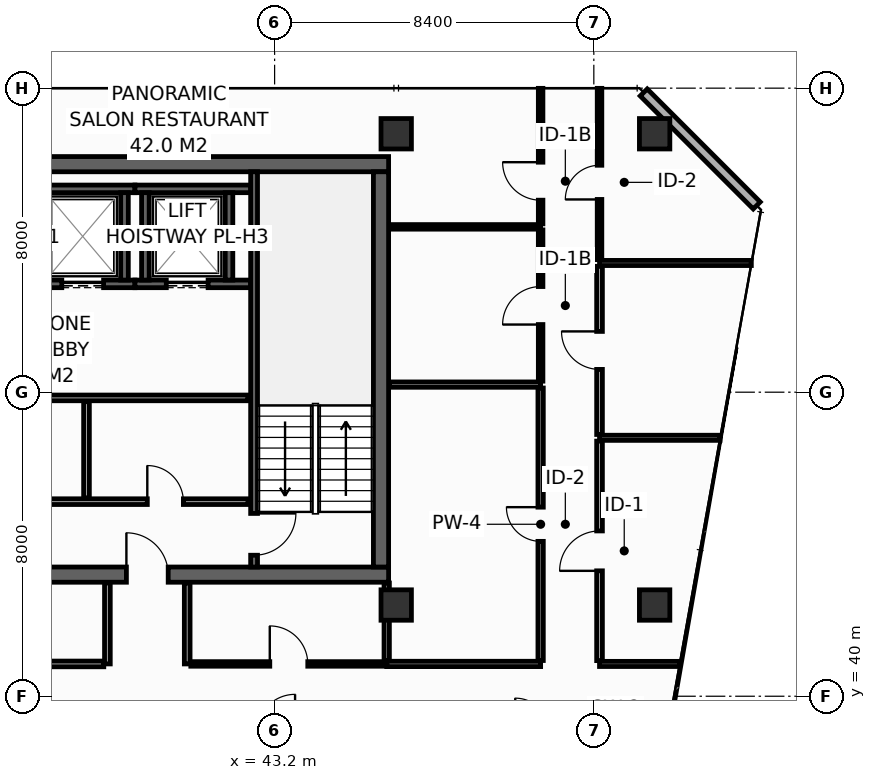
"""IFC4 building model, lengths in metres.
Left out: names, types, materials, properties, quantities, classifications, styles, units other than length and angle.
Written with IfcOpenShell. Run it as: python <this file> out.ifc"""

import sys

from ifc_helpers import new_model, si_unit, direction, frame, frame_2d, origin, origin_2d, place, context, subcontext, project, spatial, rectangle, hollow_rectangle, extrude, element, fill, save


model = new_model("IFC4")
c1 = context("Model", 3, precision=1e-05, world=origin(), true_north=direction((0.0, 1.0)))
c2 = subcontext(c1, "Body", "Model", "MODEL_VIEW")
j1 = project(units=[si_unit("LENGTHUNIT", "METRE"), si_unit("PLANEANGLEUNIT", "RADIAN")], contexts=[c1])
p1 = place(None, origin())
s1 = spatial("IfcSite", under=j1, at=p1, CompositionType="ELEMENT")
p2 = place(p1, origin())
s2 = spatial("IfcBuilding", under=s1, at=p2, CompositionType="ELEMENT")
p3 = place(p2, frame((0.0, 0.0, 253.4)))
s3 = spatial("IfcBuildingStorey", under=s2, at=p3, CompositionType="ELEMENT", Elevation=253.4)
p4 = place(p3, frame((13.7, 43.2, 0.0), z_axis=(0.0, 0.0, 1.0), x_axis=(1.0, 0.0, 0.0)))
e1 = element("IfcWall", 1, at=p4, inside=s3, PredefinedType="SHEAR", context=c2, shape_type="SweptSolid", body=[
    extrude(rectangle(XDim=32.5, YDim=0.4, at=frame_2d((16.25, 0.0))), origin(), (0.0, 0.0, 1.0), 3.55),
])
p5 = place(p4, frame((5.4, 0.0, 0.0)))
e2 = element("IfcOpeningElement", 2, at=p5, cuts=e1, PredefinedType="OPENING", context=c2, shape_type="SweptSolid", body=[
    extrude(rectangle(XDim=1.1, YDim=2.15, at=frame_2d((0.55, 1.075))), frame((0.0, 0.21, 0.0), z_axis=(0.0, -1.0, 0.0), x_axis=(1.0, 0.0, 0.0)), (0.0, 0.0, 1.0), 0.42),
])
p6 = place(p4, frame((25.6, 0.0, 0.0)))
e3 = element("IfcOpeningElement", 3, at=p6, cuts=e1, PredefinedType="OPENING", context=c2, shape_type="SweptSolid", body=[
    extrude(rectangle(XDim=1.1, YDim=2.15, at=frame_2d((0.55, 1.075))), frame((0.0, 0.21, 0.0), z_axis=(0.0, -1.0, 0.0), x_axis=(1.0, 0.0, 0.0)), (0.0, 0.0, 1.0), 0.42),
])
p7 = place(p3, frame((13.7, 54.0, 0.0), z_axis=(0.0, 0.0, 1.0), x_axis=(1.0, 0.0, 0.0)))
e4 = element("IfcWall", 4, at=p7, inside=s3, PredefinedType="SHEAR", context=c2, shape_type="SweptSolid", body=[
    extrude(rectangle(XDim=32.5, YDim=0.4, at=frame_2d((16.25, 0.0))), origin(), (0.0, 0.0, 1.0), 3.55),
])
p8 = place(p3, frame((46.0, 43.4, 0.0), z_axis=(0.0, 0.0, 1.0), x_axis=(0.0, 1.0, 0.0)))
e5 = element("IfcWall", 5, at=p8, inside=s3, PredefinedType="SHEAR", context=c2, shape_type="SweptSolid", body=[
    extrude(rectangle(XDim=10.4, YDim=0.4, at=frame_2d((5.2, 0.0))), origin(), (0.0, 0.0, 1.0), 3.55),
])
for number, where, z_axis, x_axis in (
    (6, (46.4, 54.8, 0.0), (0.0, 0.0, 1.0), (1.0, 0.0, 0.0)),
    (7, (53.2, 54.8, 0.0), (0.0, 0.0, 1.0), (1.0, 0.0, 0.0)),
    (8, (46.4, 42.4, 0.0), (0.0, 0.0, 1.0), (1.0, 0.0, 0.0)),
    (9, (53.2, 42.4, 0.0), (0.0, 0.0, 1.0), (1.0, 0.0, 0.0)),
):
    element("IfcColumn", number, at=place(p3, frame(where, z_axis=z_axis, x_axis=x_axis)), inside=s3, PredefinedType="COLUMN", context=c2, shape_type="SweptSolid", body=[
        extrude(hollow_rectangle(XDim=0.8, YDim=0.8, WallThickness=0.036, at=origin_2d()), origin(), (0.0, 0.0, 1.0), 3.8),
    ])
p9 = place(p3, frame((36.775, 50.85, 0.0), z_axis=(0.0, 0.0, 1.0), x_axis=(1.0, 0.0, 0.0)))
e10 = element("IfcWall", 10, at=p9, inside=s3, PredefinedType="SHEAR", context=c2, shape_type="SweptSolid", body=[
    extrude(rectangle(XDim=2.75, YDim=0.2, at=frame_2d((1.375, 0.0))), origin(), (0.0, 0.0, 1.0), 3.55),
])
p10 = place(p9, frame((0.825, 0.0, 0.0)))
e11 = element("IfcOpeningElement", 11, at=p10, cuts=e10, PredefinedType="OPENING", context=c2, shape_type="SweptSolid", body=[
    extrude(rectangle(XDim=1.1, YDim=2.2, at=frame_2d((0.55, 1.1))), frame((0.0, 0.11, 0.0), z_axis=(0.0, -1.0, 0.0), x_axis=(1.0, 0.0, 0.0)), (0.0, 0.0, 1.0), 0.22),
])
p11 = place(p3, frame((36.775, 53.35, 0.0), z_axis=(0.0, 0.0, 1.0), x_axis=(1.0, 0.0, 0.0)))
e12 = element("IfcWall", 12, at=p11, inside=s3, PredefinedType="SHEAR", context=c2, shape_type="SweptSolid", body=[
    extrude(rectangle(XDim=2.75, YDim=0.2, at=frame_2d((1.375, 0.0))), origin(), (0.0, 0.0, 1.0), 3.55),
])
p12 = place(p3, frame((39.25, 50.95, 0.0), z_axis=(0.0, 0.0, 1.0), x_axis=(0.0, 1.0, 0.0)))
e13 = element("IfcWall", 13, at=p12, inside=s3, PredefinedType="SHEAR", context=c2, shape_type="SweptSolid", body=[
    extrude(rectangle(XDim=2.3, YDim=0.2, at=frame_2d((1.15, 0.0))), origin(), (0.0, 0.0, 1.0), 3.55),
])
p13 = place(p3, frame((39.525, 50.85, 0.0), z_axis=(0.0, 0.0, 1.0), x_axis=(1.0, 0.0, 0.0)))
e14 = element("IfcWall", 14, at=p13, inside=s3, PredefinedType="SHEAR", context=c2, shape_type="SweptSolid", body=[
    extrude(rectangle(XDim=3.045, YDim=0.2, at=frame_2d((1.522, 0.0))), origin(), (0.0, 0.0, 1.0), 3.55),
])
p14 = place(p13, frame((0.825, 0.0, 0.0)))
e15 = element("IfcOpeningElement", 15, at=p14, cuts=e14, PredefinedType="OPENING", context=c2, shape_type="SweptSolid", body=[
    extrude(rectangle(XDim=1.1, YDim=2.2, at=frame_2d((0.55, 1.1))), frame((0.0, 0.11, 0.0), z_axis=(0.0, -1.0, 0.0), x_axis=(1.0, 0.0, 0.0)), (0.0, 0.0, 1.0), 0.22),
])
p15 = place(p3, frame((39.525, 53.35, 0.0), z_axis=(0.0, 0.0, 1.0), x_axis=(1.0, 0.0, 0.0)))
e16 = element("IfcWall", 16, at=p15, inside=s3, PredefinedType="SHEAR", context=c2, shape_type="SweptSolid", body=[
    extrude(rectangle(XDim=3.045, YDim=0.2, at=frame_2d((1.522, 0.0))), origin(), (0.0, 0.0, 1.0), 3.55),
])
for number, where, z_axis, x_axis in (
    (17, (39.8, 50.95, 0.0), (0.0, 0.0, 1.0), (0.0, 1.0, 0.0)),
    (18, (42.0, 50.95, 0.0), (0.0, 0.0, 1.0), (0.0, 1.0, 0.0)),
):
    element("IfcWall", number, at=place(p3, frame(where, z_axis=z_axis, x_axis=x_axis)), inside=s3, PredefinedType="SHEAR", context=c2, shape_type="SweptSolid", body=[
        extrude(rectangle(XDim=2.3, YDim=0.2, at=frame_2d((1.15, 0.0))), origin(), (0.0, 0.0, 1.0), 3.55),
    ])
p16 = place(p3, frame((42.66, 53.8, 0.0), z_axis=(0.0, 0.0, 1.0), x_axis=(0.0, -1.0, 0.0)))
e19 = element("IfcWall", 19, at=p16, inside=s3, PredefinedType="SHEAR", context=c2, shape_type="SweptSolid", body=[
    extrude(rectangle(XDim=10.4, YDim=0.18, at=frame_2d((5.2, 0.0))), origin(), (0.0, 0.0, 1.0), 3.55),
])
p17 = place(p16, frame((8.99, 0.0, 0.0)))
e20 = element("IfcOpeningElement", 20, at=p17, cuts=e19, PredefinedType="OPENING", context=c2, shape_type="SweptSolid", body=[
    extrude(rectangle(XDim=1.1, YDim=2.15, at=frame_2d((0.55, 1.075))), frame((0.0, 0.1, 0.0), z_axis=(0.0, -1.0, 0.0), x_axis=(1.0, 0.0, 0.0)), (0.0, 0.0, 1.0), 0.2),
])
p18 = place(p3, frame((34.05, 45.12, 0.0), z_axis=(0.0, 0.0, 1.0), x_axis=(1.0, 0.0, 0.0)))
e21 = element("IfcWall", 21, at=p18, inside=s3, PredefinedType="PARTITIONING", context=c2, shape_type="SweptSolid", body=[
    extrude(rectangle(XDim=8.45, YDim=0.15, at=frame_2d((4.225, 0.0))), origin(), (0.0, 0.0, 1.0), 3.55),
])
p19 = place(p18, frame((1.5, 0.0, 0.0)))
e22 = element("IfcOpeningElement", 22, at=p19, cuts=e21, PredefinedType="OPENING", context=c2, shape_type="SweptSolid", body=[
    extrude(rectangle(XDim=0.95, YDim=2.15, at=frame_2d((0.475, 1.075))), frame((0.0, 0.085, 0.0), z_axis=(0.0, -1.0, 0.0), x_axis=(1.0, 0.0, 0.0)), (0.0, 0.0, 1.0), 0.17),
])
p20 = place(p18, frame((5.8, 0.0, 0.0)))
e23 = element("IfcOpeningElement", 23, at=p20, cuts=e21, PredefinedType="OPENING", context=c2, shape_type="SweptSolid", body=[
    extrude(rectangle(XDim=0.95, YDim=2.15, at=frame_2d((0.475, 1.075))), frame((0.0, 0.085, 0.0), z_axis=(0.0, -1.0, 0.0), x_axis=(1.0, 0.0, 0.0)), (0.0, 0.0, 1.0), 0.17),
])
p21 = place(p3, frame((34.05, 47.85, 0.0), z_axis=(0.0, 0.0, 1.0), x_axis=(1.0, 0.0, 0.0)))
e24 = element("IfcWall", 24, at=p21, inside=s3, PredefinedType="PARTITIONING", context=c2, shape_type="SweptSolid", body=[
    extrude(rectangle(XDim=8.45, YDim=0.15, at=frame_2d((4.225, 0.0))), origin(), (0.0, 0.0, 1.0), 3.55),
])
p22 = place(p3, frame((38.25, 45.22, 0.0), z_axis=(0.0, 0.0, 1.0), x_axis=(0.0, 1.0, 0.0)))
e25 = element("IfcWall", 25, at=p22, inside=s3, PredefinedType="PARTITIONING", context=c2, shape_type="SweptSolid", body=[
    extrude(rectangle(XDim=2.53, YDim=0.15, at=frame_2d((1.265, 0.0))), origin(), (0.0, 0.0, 1.0), 3.55),
])
p23 = place(p3, frame((55.887, 52.913, 0.0), z_axis=(0.0, 0.0, 1.0), x_axis=(-0.707106781187, 0.707106781187, 0.0)))
e26 = element("IfcWall", 26, at=p23, inside=s3, PredefinedType="STANDARD", context=c2, shape_type="SweptSolid", body=[
    extrude(rectangle(XDim=4.206, YDim=0.26, at=frame_2d((2.103, 0.0))), origin(), (0.0, 0.0, 1.0), 3.55),
])
p24 = place(p3, frame((46.15, 40.85, 0.0), z_axis=(0.0, 0.0, 1.0), x_axis=(1.0, 0.0, 0.0)))
e27 = element("IfcWall", 27, at=p24, inside=s3, PredefinedType="PARTITIONING", context=c2, shape_type="SweptSolid", body=[
    extrude(rectangle(XDim=4.05, YDim=0.14, at=frame_2d((2.025, 0.0))), origin(), (0.0, 0.0, 1.0), 3.55),
])
p25 = place(p3, frame((46.15, 40.94, 0.0), z_axis=(0.0, 0.0, 1.0), x_axis=(0.0, 1.0, 0.0)))
e28 = element("IfcWall", 28, at=p25, inside=s3, PredefinedType="PARTITIONING", context=c2, shape_type="SweptSolid", body=[
    extrude(rectangle(XDim=2.04, YDim=0.14, at=frame_2d((1.02, 0.0))), origin(), (0.0, 0.0, 1.0), 3.55),
])
p26 = place(p3, frame((46.22, 48.2, 0.0), z_axis=(0.0, 0.0, 1.0), x_axis=(1.0, 0.0, 0.0)))
e29 = element("IfcWall", 29, at=p26, inside=s3, PredefinedType="PARTITIONING", context=c2, shape_type="SweptSolid", body=[
    extrude(rectangle(XDim=3.98, YDim=0.14, at=frame_2d((1.99, 0.0))), origin(), (0.0, 0.0, 1.0), 3.55),
])
p27 = place(p3, frame((50.2, 40.94, 0.0), z_axis=(0.0, 0.0, 1.0), x_axis=(0.0, 1.0, 0.0)))
e30 = element("IfcWall", 30, at=p27, inside=s3, PredefinedType="PARTITIONING", context=c2, shape_type="SweptSolid", body=[
    extrude(rectangle(XDim=7.17, YDim=0.14, at=frame_2d((3.585, 0.0))), origin(), (0.0, 0.0, 1.0), 2.947),
])
p28 = place(p27, frame((3.135, 0.0, 0.0)))
e31 = element("IfcOpeningElement", 31, at=p28, cuts=e30, PredefinedType="OPENING", context=c2, shape_type="SweptSolid", body=[
    extrude(rectangle(XDim=0.9, YDim=2.1, at=frame_2d((0.45, 1.05))), frame((0.0, 0.08, 0.0), z_axis=(0.0, -1.0, 0.0), x_axis=(1.0, 0.0, 0.0)), (0.0, 0.0, 1.0), 0.16),
])
p29 = place(p3, frame((46.22, 52.35, 0.0), z_axis=(0.0, 0.0, 1.0), x_axis=(1.0, 0.0, 0.0)))
e32 = element("IfcWall", 32, at=p29, inside=s3, PredefinedType="PARTITIONING", context=c2, shape_type="SweptSolid", body=[
    extrude(rectangle(XDim=3.98, YDim=0.12, at=frame_2d((1.99, 0.0))), origin(), (0.0, 0.0, 1.0), 3.55),
])
p30 = place(p3, frame((50.2, 48.29, 0.0), z_axis=(0.0, 0.0, 1.0), x_axis=(0.0, 1.0, 0.0)))
e33 = element("IfcWall", 33, at=p30, inside=s3, PredefinedType="PARTITIONING", context=c2, shape_type="SweptSolid", body=[
    extrude(rectangle(XDim=3.98, YDim=0.12, at=frame_2d((1.99, 0.0))), origin(), (0.0, 0.0, 1.0), 3.55),
])
p31 = place(p30, frame((1.49, 0.0, 0.0)))
e34 = element("IfcOpeningElement", 34, at=p31, cuts=e33, PredefinedType="OPENING", context=c2, shape_type="SweptSolid", body=[
    extrude(rectangle(XDim=1.0, YDim=2.15, at=frame_2d((0.5, 1.075))), frame((0.0, 0.07, 0.0), z_axis=(0.0, -1.0, 0.0), x_axis=(1.0, 0.0, 0.0)), (0.0, 0.0, 1.0), 0.14),
])
p32 = place(p3, frame((50.2, 52.43, 0.0), z_axis=(0.0, 0.0, 1.0), x_axis=(0.0, 1.0, 0.0)))
e35 = element("IfcWall", 35, at=p32, inside=s3, PredefinedType="PARTITIONING", context=c2, shape_type="SweptSolid", body=[
    extrude(rectangle(XDim=3.565, YDim=0.12, at=frame_2d((1.783, 0.0))), origin(), (0.0, 0.0, 1.0), 2.935),
])
p33 = place(p32, frame((0.622, 0.0, 0.0)))
e36 = element("IfcOpeningElement", 36, at=p33, cuts=e35, PredefinedType="OPENING", context=c2, shape_type="SweptSolid", body=[
    extrude(rectangle(XDim=1.0, YDim=2.15, at=frame_2d((0.5, 1.075))), frame((0.0, 0.07, 0.0), z_axis=(0.0, -1.0, 0.0), x_axis=(1.0, 0.0, 0.0)), (0.0, 0.0, 1.0), 0.14),
])
p34 = place(p3, frame((51.75, 40.85, 0.0), z_axis=(0.0, 0.0, 1.0), x_axis=(1.0, 0.0, 0.0)))
e37 = element("IfcWall", 37, at=p34, inside=s3, PredefinedType="PARTITIONING", context=c2, shape_type="SweptSolid", body=[
    extrude(rectangle(XDim=2.107, YDim=0.135, at=frame_2d((1.053, 0.0))), origin(), (0.0, 0.0, 1.0), 3.085),
])
p35 = place(p3, frame((51.75, 46.8, 0.0), z_axis=(0.0, 0.0, 1.0), x_axis=(1.0, 0.0, 0.0)))
e38 = element("IfcWall", 38, at=p35, inside=s3, PredefinedType="PARTITIONING", context=c2, shape_type="SweptSolid", body=[
    extrude(rectangle(XDim=3.171, YDim=0.135, at=frame_2d((1.586, 0.0))), origin(), (0.0, 0.0, 1.0), 2.947),
])
p36 = place(p3, frame((51.75, 51.4, 0.0), z_axis=(0.0, 0.0, 1.0), x_axis=(1.0, 0.0, 0.0)))
e39 = element("IfcWall", 39, at=p36, inside=s3, PredefinedType="PARTITIONING", context=c2, shape_type="SweptSolid", body=[
    extrude(rectangle(XDim=3.994, YDim=0.135, at=frame_2d((1.997, 0.0))), origin(), (0.0, 0.0, 1.0), 2.947),
])
p37 = place(p3, frame((51.75, 40.938, 0.0), z_axis=(0.0, 0.0, 1.0), x_axis=(0.0, 1.0, 0.0)))
e40 = element("IfcWall", 40, at=p37, inside=s3, PredefinedType="PARTITIONING", context=c2, shape_type="SweptSolid", body=[
    extrude(rectangle(XDim=5.775, YDim=0.15, at=frame_2d((2.887, 0.0))), origin(), (0.0, 0.0, 1.0), 2.947),
])
p38 = place(p37, frame((2.362, 0.0, 0.0)))
e41 = element("IfcOpeningElement", 41, at=p38, cuts=e40, PredefinedType="OPENING", context=c2, shape_type="SweptSolid", body=[
    extrude(rectangle(XDim=1.05, YDim=2.15, at=frame_2d((0.525, 1.075))), frame((0.0, 0.085, 0.0), z_axis=(0.0, -1.0, 0.0), x_axis=(1.0, 0.0, 0.0)), (0.0, 0.0, 1.0), 0.17),
])
p39 = place(p3, frame((51.75, 46.887, 0.0), z_axis=(0.0, 0.0, 1.0), x_axis=(0.0, 1.0, 0.0)))
e42 = element("IfcWall", 42, at=p39, inside=s3, PredefinedType="PARTITIONING", context=c2, shape_type="SweptSolid", body=[
    extrude(rectangle(XDim=4.425, YDim=0.15, at=frame_2d((2.212, 0.0))), origin(), (0.0, 0.0, 1.0), 3.55),
])
p40 = place(p39, frame((1.712, 0.0, 0.0)))
e43 = element("IfcOpeningElement", 43, at=p40, cuts=e42, PredefinedType="OPENING", context=c2, shape_type="SweptSolid", body=[
    extrude(rectangle(XDim=1.0, YDim=2.15, at=frame_2d((0.5, 1.075))), frame((0.0, 0.085, 0.0), z_axis=(0.0, -1.0, 0.0), x_axis=(1.0, 0.0, 0.0)), (0.0, 0.0, 1.0), 0.17),
])
p41 = place(p3, frame((51.75, 51.488, 0.0), z_axis=(0.0, 0.0, 1.0), x_axis=(0.0, 1.0, 0.0)))
e44 = element("IfcWall", 44, at=p41, inside=s3, PredefinedType="PARTITIONING", context=c2, shape_type="SweptSolid", body=[
    extrude(rectangle(XDim=4.508, YDim=0.12, at=frame_2d((2.254, 0.0))), origin(), (0.0, 0.0, 1.0), 2.935),
])
p42 = place(p41, frame((1.584, 0.0, 0.0)))
e45 = element("IfcOpeningElement", 45, at=p42, cuts=e44, PredefinedType="OPENING", context=c2, shape_type="SweptSolid", body=[
    extrude(rectangle(XDim=0.9, YDim=2.1, at=frame_2d((0.45, 1.05))), frame((0.0, 0.07, 0.0), z_axis=(0.0, -1.0, 0.0), x_axis=(1.0, 0.0, 0.0)), (0.0, 0.0, 1.0), 0.14),
])
for number, where, z_axis, x_axis in (
    (46, (38.8, 40.85, 0.0), (0.0, 0.0, 1.0), (0.0, 1.0, 0.0)),
    (47, (40.9, 40.85, 0.0), (0.0, 0.0, 1.0), (0.0, 1.0, 0.0)),
):
    element("IfcWall", number, at=place(p3, frame(where, z_axis=z_axis, x_axis=x_axis)), inside=s3, PredefinedType="PARTITIONING", context=c2, shape_type="SweptSolid", body=[
        extrude(rectangle(XDim=2.13, YDim=0.15, at=frame_2d((1.065, 0.0))), origin(), (0.0, 0.0, 1.0), 3.55),
    ])
p43 = place(p3, frame((33.08, 40.85, 0.0), z_axis=(0.0, 0.0, 1.0), x_axis=(1.0, 0.0, 0.0)))
e48 = element("IfcWall", 48, at=p43, inside=s3, PredefinedType="PARTITIONING", context=c2, shape_type="SweptSolid", body=[
    extrude(rectangle(XDim=5.625, YDim=0.15, at=frame_2d((2.812, 0.0))), origin(), (0.0, 0.0, 1.0), 2.947),
])
p44 = place(p43, frame((1.652, 0.0, 0.0)))
e49 = element("IfcOpeningElement", 49, at=p44, cuts=e48, PredefinedType="OPENING", context=c2, shape_type="SweptSolid", body=[
    extrude(rectangle(XDim=1.0, YDim=2.15, at=frame_2d((0.5, 1.075))), frame((0.0, 0.085, 0.0), z_axis=(0.0, -1.0, 0.0), x_axis=(1.0, 0.0, 0.0)), (0.0, 0.0, 1.0), 0.17),
])
p45 = place(p3, frame((40.995, 40.85, 0.0), z_axis=(0.0, 0.0, 1.0), x_axis=(1.0, 0.0, 0.0)))
e50 = element("IfcWall", 50, at=p45, inside=s3, PredefinedType="PARTITIONING", context=c2, shape_type="SweptSolid", body=[
    extrude(rectangle(XDim=5.155, YDim=0.12, at=frame_2d((2.577, 0.0))), origin(), (0.0, 0.0, 1.0), 3.55),
])
p46 = place(p45, frame((2.078, 0.0, 0.0)))
e51 = element("IfcOpeningElement", 51, at=p46, cuts=e50, PredefinedType="OPENING", context=c2, shape_type="SweptSolid", body=[
    extrude(rectangle(XDim=1.0, YDim=2.15, at=frame_2d((0.5, 1.075))), frame((0.0, 0.07, 0.0), z_axis=(0.0, -1.0, 0.0), x_axis=(1.0, 0.0, 0.0)), (0.0, 0.0, 1.0), 0.14),
])
p47 = place(p10, origin())
e52 = element("IfcDoor", 52, at=p47, inside=s3, OperationType="SLIDING_TO_LEFT", PredefinedType="DOOR", context=c2, shape_type="SweptSolid", body=[
    extrude(rectangle(XDim=1.1, YDim=2.2, at=frame_2d((0.55, 1.1))), frame((0.0, 0.025, 0.0), z_axis=(0.0, -1.0, 0.0), x_axis=(1.0, 0.0, 0.0)), (0.0, 0.0, 1.0), 0.05),
])
fill(e11, e52)
p48 = place(p14, origin())
e53 = element("IfcDoor", 53, at=p48, inside=s3, OperationType="SLIDING_TO_LEFT", PredefinedType="DOOR", context=c2, shape_type="SweptSolid", body=[
    extrude(rectangle(XDim=1.1, YDim=2.2, at=frame_2d((0.55, 1.1))), frame((0.0, 0.025, 0.0), z_axis=(0.0, -1.0, 0.0), x_axis=(1.0, 0.0, 0.0)), (0.0, 0.0, 1.0), 0.05),
])
fill(e15, e53)
p49 = place(p17, origin())
e54 = element("IfcDoor", 54, at=p49, inside=s3, OperationType="SINGLE_SWING_LEFT", PredefinedType="DOOR", context=c2, shape_type="SweptSolid", body=[
    extrude(rectangle(XDim=1.1, YDim=2.15, at=frame_2d((0.55, 1.075))), frame((0.0, 0.025, 0.0), z_axis=(0.0, -1.0, 0.0), x_axis=(1.0, 0.0, 0.0)), (0.0, 0.0, 1.0), 0.05),
])
fill(e20, e54)
p50 = place(p6, origin())
e55 = element("IfcDoor", 55, at=p50, inside=s3, OperationType="SINGLE_SWING_LEFT", PredefinedType="DOOR", context=c2, shape_type="SweptSolid", body=[
    extrude(rectangle(XDim=1.1, YDim=2.15, at=frame_2d((0.55, 1.075))), frame((0.0, 0.025, 0.0), z_axis=(0.0, -1.0, 0.0), x_axis=(1.0, 0.0, 0.0)), (0.0, 0.0, 1.0), 0.05),
])
fill(e3, e55)
p51 = place(p20, origin())
e56 = element("IfcDoor", 56, at=p51, inside=s3, OperationType="SINGLE_SWING_LEFT", PredefinedType="DOOR", context=c2, shape_type="SweptSolid", body=[
    extrude(rectangle(XDim=0.95, YDim=2.15, at=frame_2d((0.475, 1.075))), frame((0.0, 0.025, 0.0), z_axis=(0.0, -1.0, 0.0), x_axis=(1.0, 0.0, 0.0)), (0.0, 0.0, 1.0), 0.05),
])
fill(e23, e56)
p52 = place(p28, origin())
e57 = element("IfcDoor", 57, at=p52, inside=s3, OperationType="SINGLE_SWING_RIGHT", PredefinedType="DOOR", context=c2, shape_type="SweptSolid", body=[
    extrude(rectangle(XDim=0.9, YDim=2.1, at=frame_2d((0.45, 1.05))), frame((0.0, 0.025, 0.0), z_axis=(0.0, -1.0, 0.0), x_axis=(1.0, 0.0, 0.0)), (0.0, 0.0, 1.0), 0.05),
])
fill(e31, e57)
p53 = place(p31, origin())
e58 = element("IfcDoor", 58, at=p53, inside=s3, OperationType="SINGLE_SWING_LEFT", PredefinedType="DOOR", context=c2, shape_type="SweptSolid", body=[
    extrude(rectangle(XDim=1.0, YDim=2.15, at=frame_2d((0.5, 1.075))), frame((0.0, 0.025, 0.0), z_axis=(0.0, -1.0, 0.0), x_axis=(1.0, 0.0, 0.0)), (0.0, 0.0, 1.0), 0.05),
])
fill(e34, e58)
p54 = place(p33, origin())
e59 = element("IfcDoor", 59, at=p54, inside=s3, OperationType="SINGLE_SWING_RIGHT", PredefinedType="DOOR", context=c2, shape_type="SweptSolid", body=[
    extrude(rectangle(XDim=1.0, YDim=2.15, at=frame_2d((0.5, 1.075))), frame((0.0, 0.025, 0.0), z_axis=(0.0, -1.0, 0.0), x_axis=(1.0, 0.0, 0.0)), (0.0, 0.0, 1.0), 0.05),
])
fill(e36, e59)
p55 = place(p38, origin())
e60 = element("IfcDoor", 60, at=p55, inside=s3, OperationType="SINGLE_SWING_LEFT", PredefinedType="DOOR", context=c2, shape_type="SweptSolid", body=[
    extrude(rectangle(XDim=1.05, YDim=2.15, at=frame_2d((0.525, 1.075))), frame((0.0, 0.025, 0.0), z_axis=(0.0, -1.0, 0.0), x_axis=(1.0, 0.0, 0.0)), (0.0, 0.0, 1.0), 0.05),
])
fill(e41, e60)
p56 = place(p40, origin())
e61 = element("IfcDoor", 61, at=p56, inside=s3, OperationType="SINGLE_SWING_RIGHT", PredefinedType="DOOR", context=c2, shape_type="SweptSolid", body=[
    extrude(rectangle(XDim=1.0, YDim=2.15, at=frame_2d((0.5, 1.075))), frame((0.0, 0.025, 0.0), z_axis=(0.0, -1.0, 0.0), x_axis=(1.0, 0.0, 0.0)), (0.0, 0.0, 1.0), 0.05),
])
fill(e43, e61)
p57 = place(p42, origin())
e62 = element("IfcDoor", 62, at=p57, inside=s3, OperationType="SINGLE_SWING_LEFT", PredefinedType="DOOR", context=c2, shape_type="SweptSolid", body=[
    extrude(rectangle(XDim=0.9, YDim=2.1, at=frame_2d((0.45, 1.05))), frame((0.0, 0.025, 0.0), z_axis=(0.0, -1.0, 0.0), x_axis=(1.0, 0.0, 0.0)), (0.0, 0.0, 1.0), 0.05),
])
fill(e45, e62)
p58 = place(p46, origin())
e63 = element("IfcDoor", 63, at=p58, inside=s3, OperationType="SINGLE_SWING_LEFT", PredefinedType="DOOR", context=c2, shape_type="SweptSolid", body=[
    extrude(rectangle(XDim=1.0, YDim=2.15, at=frame_2d((0.5, 1.075))), frame((0.0, 0.025, 0.0), z_axis=(0.0, -1.0, 0.0), x_axis=(1.0, 0.0, 0.0)), (0.0, 0.0, 1.0), 0.05),
])
fill(e51, e63)
save(model, sys.argv[1])
